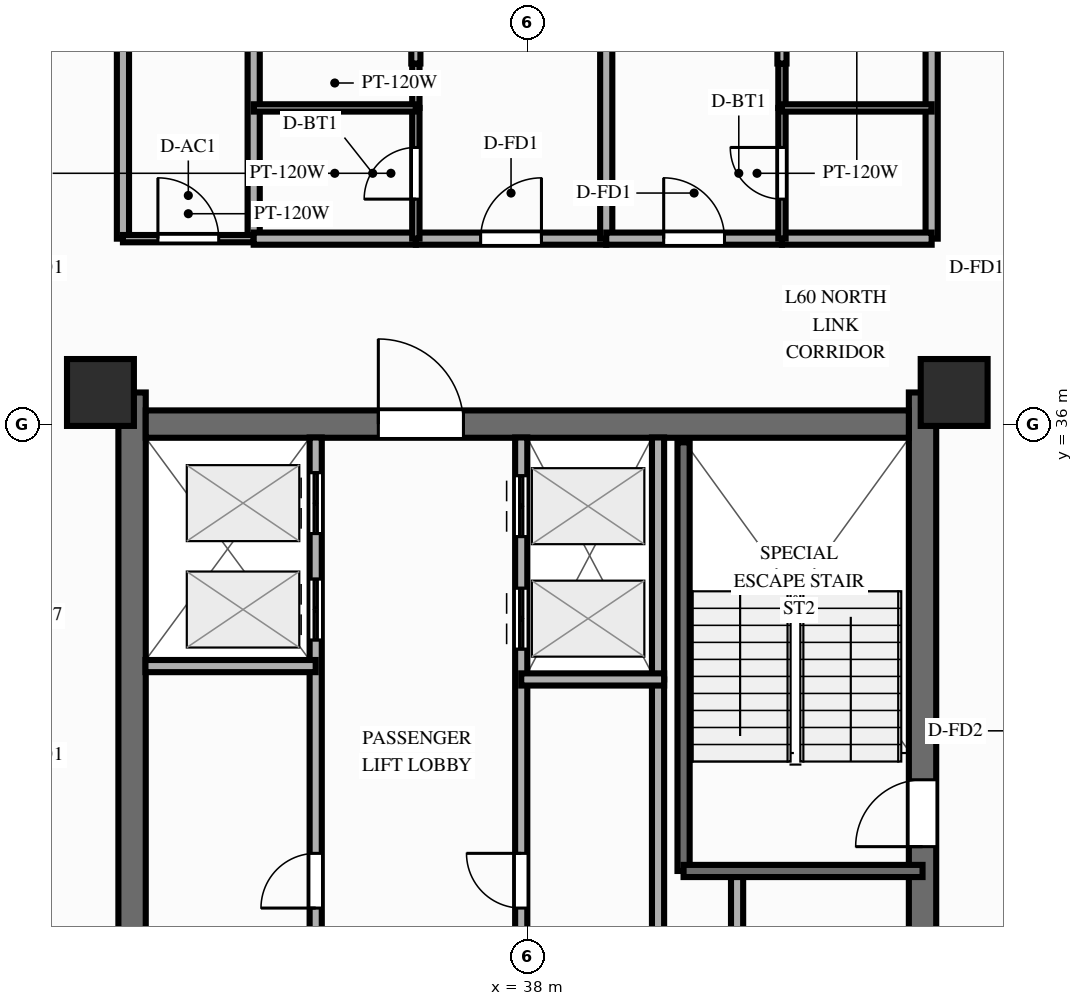
"""IFC4 building model, lengths in metres.
Left out: names, types, materials, properties, quantities, classifications, styles, units other than length and angle.
Written with IfcOpenShell. Run it as: python <this file> out.ifc"""

import sys

from ifc_helpers import new_model, si_unit, direction, frame, frame_2d, origin, origin_2d, place, context, subcontext, project, spatial, rectangle, extrude, source, transform, mapped, element, fill, save


model = new_model("IFC4")
c1 = context("Model", 3, precision=1e-05, world=origin(), true_north=direction((0.0, 1.0)))
c2 = subcontext(c1, "Body", "Model", "MODEL_VIEW")
j1 = project(units=[si_unit("LENGTHUNIT", "METRE"), si_unit("PLANEANGLEUNIT", "RADIAN")], contexts=[c1])
p1 = place(None, origin())
s1 = spatial("IfcSite", under=j1, at=p1, CompositionType="ELEMENT")
p2 = place(p1, origin())
s2 = spatial("IfcBuilding", under=s1, at=p2, CompositionType="ELEMENT")
p3 = place(p2, frame((0.0, 0.0, 192.7)))
s3 = spatial("IfcBuildingStorey", under=s2, at=p3, CompositionType="ELEMENT", Elevation=192.7)
p4 = place(p3, frame((31.5, 17.48, 0.0), z_axis=(0.0, 0.0, 1.0), x_axis=(0.0, 1.0, 0.0)))
e1 = element("IfcWall", 1, at=p4, inside=s3, PredefinedType="SHEAR", context=c2, shape_type="SweptSolid", body=[
    extrude(rectangle(XDim=19.04, YDim=0.45, at=frame_2d((9.52, 0.0))), origin(), (0.0, 0.0, 1.0), 3.9),
])
p5 = place(p4, frame((6.32, 0.0, 0.0)))
e2 = element("IfcOpeningElement", 2, at=p5, cuts=e1, PredefinedType="OPENING", context=c2, shape_type="SweptSolid", body=[
    extrude(rectangle(XDim=1.1, YDim=2.15, at=frame_2d((0.55, 1.075))), frame((0.0, 0.237, 0.0), z_axis=(0.0, -1.0, 0.0), x_axis=(1.0, 0.0, 0.0)), (0.0, 0.0, 1.0), 0.474),
])
p6 = place(p3, frame((44.5, 17.48, 0.0), z_axis=(0.0, 0.0, 1.0), x_axis=(0.0, 1.0, 0.0)))
e3 = element("IfcWall", 3, at=p6, inside=s3, PredefinedType="SHEAR", context=c2, shape_type="SweptSolid", body=[
    extrude(rectangle(XDim=19.04, YDim=0.45, at=frame_2d((9.52, 0.0))), origin(), (0.0, 0.0, 1.0), 3.9),
])
p7 = place(p6, frame((12.67, 0.0, 0.0), z_axis=(0.0, 0.0, 1.0), x_axis=(-1.0, 0.0, 0.0)))
e4 = element("IfcOpeningElement", 4, at=p7, cuts=e3, PredefinedType="OPENING", context=c2, shape_type="SweptSolid", body=[
    extrude(rectangle(XDim=1.1, YDim=2.15, at=frame_2d((0.55, 1.075))), frame((0.0, 0.237, 0.0), z_axis=(0.0, -1.0, 0.0), x_axis=(1.0, 0.0, 0.0)), (0.0, 0.0, 1.0), 0.474),
])
p8 = place(p3, frame((31.725, 36.0, 0.0), z_axis=(0.0, 0.0, 1.0), x_axis=(1.0, 0.0, 0.0)))
e5 = element("IfcWall", 5, at=p8, inside=s3, PredefinedType="SHEAR", context=c2, shape_type="SweptSolid", body=[
    extrude(rectangle(XDim=12.55, YDim=0.45, at=frame_2d((6.275, 0.0))), origin(), (0.0, 0.0, 1.0), 3.9),
])
p9 = place(p8, frame((5.225, 0.0, 0.0), z_axis=(0.0, 0.0, 1.0), x_axis=(-1.0, 0.0, 0.0)))
e6 = element("IfcOpeningElement", 6, at=p9, cuts=e5, PredefinedType="OPENING", context=c2, shape_type="SweptSolid", body=[
    extrude(rectangle(XDim=1.4, YDim=2.15, at=frame_2d((0.7, 1.075))), frame((0.0, 0.237, 0.0), z_axis=(0.0, -1.0, 0.0), x_axis=(1.0, 0.0, 0.0)), (0.0, 0.0, 1.0), 0.474),
])
m1 = source(origin(), c2, "Body", "SweptSolid", [
    extrude(rectangle(XDim=1.1, YDim=1.1, at=origin_2d()), origin(), (0.0, 0.0, 1.0), 3.9),
])
for number, where, z_axis, x_axis in (
    (7, (30.98, 36.52, 0.0), (0.0, 0.0, 1.0), (1.0, 0.0, 0.0)),
    (8, (45.02, 36.52, 0.0), (0.0, 0.0, 1.0), (1.0, 0.0, 0.0)),
):
    element("IfcColumn", number, at=place(p3, frame(where, z_axis=z_axis, x_axis=x_axis)), inside=s3, PredefinedType="COLUMN", context=c2, shape_type="MappedRepresentation", body=[
        mapped(m1, transform((0.0, 0.0, 0.0), scale=1.0)),
    ])
p10 = place(p3, frame((41.45, 21.18, 0.0), z_axis=(0.0, 0.0, 1.0), x_axis=(0.0, 1.0, 0.0)))
e9 = element("IfcWall", 9, at=p10, inside=s3, PredefinedType="PARTITIONING", context=c2, shape_type="SweptSolid", body=[
    extrude(rectangle(XDim=7.42, YDim=0.2, at=frame_2d((3.71, 0.0))), origin(), (0.0, 0.0, 1.0), 3.56),
])
p11 = place(p10, frame((2.6, 0.0, 0.0)))
e10 = element("IfcOpeningElement", 10, at=p11, cuts=e9, PredefinedType="OPENING", context=c2, shape_type="SweptSolid", body=[
    extrude(rectangle(XDim=0.9, YDim=2.1, at=frame_2d((0.45, 1.05))), frame((0.0, 0.112, 0.0), z_axis=(0.0, -1.0, 0.0), x_axis=(1.0, 0.0, 0.0)), (0.0, 0.0, 1.0), 0.224),
])
p12 = place(p3, frame((40.15, 25.44, 0.0), z_axis=(0.0, 0.0, 1.0), x_axis=(0.0, 1.0, 0.0)))
e11 = element("IfcWall", 11, at=p12, inside=s3, PredefinedType="PARTITIONING", context=c2, shape_type="SweptSolid", body=[
    extrude(rectangle(XDim=6.36, YDim=0.2, at=frame_2d((3.18, 0.0))), origin(), (0.0, 0.0, 1.0), 3.56),
])
p13 = place(p3, frame((40.15, 31.8, 0.0), z_axis=(0.0, 0.0, 1.0), x_axis=(0.0, 1.0, 0.0)))
e12 = element("IfcWall", 12, at=p13, inside=s3, PredefinedType="PARTITIONING", context=c2, shape_type="SweptSolid", body=[
    extrude(rectangle(XDim=3.98, YDim=0.2, at=frame_2d((1.99, 0.0))), origin(), (0.0, 0.0, 1.0), 3.56),
])
p14 = place(p3, frame((40.57, 28.65, 0.0), z_axis=(0.0, 0.0, 1.0), x_axis=(0.0, 1.0, 0.0)))
e13 = element("IfcWall", 13, at=p14, inside=s3, PredefinedType="SOLIDWALL", context=c2, shape_type="SweptSolid", body=[
    extrude(rectangle(XDim=7.05, YDim=0.2, at=frame_2d((3.525, 0.0))), origin(), (0.0, 0.0, 1.0), 3.69),
])
p15 = place(p3, frame((40.57, 28.65, 0.0), z_axis=(0.0, 0.0, 1.0), x_axis=(1.0, 0.0, 0.0)))
e14 = element("IfcWall", 14, at=p15, inside=s3, PredefinedType="SOLIDWALL", context=c2, shape_type="SweptSolid", body=[
    extrude(rectangle(XDim=3.93, YDim=0.2, at=frame_2d((1.965, 0.0))), origin(), (0.0, 0.0, 1.0), 3.69),
])
p16 = place(p3, frame((34.52, 25.44, 0.0), z_axis=(0.0, 0.0, 1.0), x_axis=(0.0, 1.0, 0.0)))
e15 = element("IfcWall", 15, at=p16, inside=s3, PredefinedType="PARTITIONING", context=c2, shape_type="SweptSolid", body=[
    extrude(rectangle(XDim=10.34, YDim=0.2, at=frame_2d((5.17, 0.0))), origin(), (0.0, 0.0, 1.0), 3.56),
])
p17 = place(p16, frame((2.6, 0.0, 0.0)))
e16 = element("IfcOpeningElement", 16, at=p17, cuts=e15, PredefinedType="OPENING", context=c2, shape_type="SweptSolid", body=[
    extrude(rectangle(XDim=0.9, YDim=2.1, at=frame_2d((0.45, 1.05))), frame((0.0, 0.112, 0.0), z_axis=(0.0, -1.0, 0.0), x_axis=(1.0, 0.0, 0.0)), (0.0, 0.0, 1.0), 0.224),
])
p18 = place(p16, frame((7.01, 0.0, 0.0)))
e17 = element("IfcOpeningElement", 17, at=p18, cuts=e15, PredefinedType="OPENING", context=c2, shape_type="SweptSolid", body=[
    extrude(rectangle(XDim=1.0, YDim=2.15, at=frame_2d((0.5, 1.075))), frame((0.0, 0.112, 0.0), z_axis=(0.0, -1.0, 0.0), x_axis=(1.0, 0.0, 0.0)), (0.0, 0.0, 1.0), 0.224),
])
p19 = place(p16, frame((8.76, 0.0, 0.0)))
e18 = element("IfcOpeningElement", 18, at=p19, cuts=e15, PredefinedType="OPENING", context=c2, shape_type="SweptSolid", body=[
    extrude(rectangle(XDim=1.0, YDim=2.15, at=frame_2d((0.5, 1.075))), frame((0.0, 0.112, 0.0), z_axis=(0.0, -1.0, 0.0), x_axis=(1.0, 0.0, 0.0)), (0.0, 0.0, 1.0), 0.224),
])
p20 = place(p3, frame((31.72, 32.02, 0.0), z_axis=(0.0, 0.0, 1.0), x_axis=(1.0, 0.0, 0.0)))
e19 = element("IfcWall", 19, at=p20, inside=s3, PredefinedType="PARTITIONING", context=c2, shape_type="SweptSolid", body=[
    extrude(rectangle(XDim=2.8, YDim=0.2, at=frame_2d((1.4, 0.0))), origin(), (0.0, 0.0, 1.0), 3.56),
])
p21 = place(p3, frame((37.9, 25.44, 0.0), z_axis=(0.0, 0.0, 1.0), x_axis=(0.0, 1.0, 0.0)))
e20 = element("IfcWall", 20, at=p21, inside=s3, PredefinedType="PARTITIONING", context=c2, shape_type="SweptSolid", body=[
    extrude(rectangle(XDim=10.34, YDim=0.2, at=frame_2d((5.17, 0.0))), origin(), (0.0, 0.0, 1.0), 3.56),
])
p22 = place(p21, frame((2.6, 0.0, 0.0)))
e21 = element("IfcOpeningElement", 21, at=p22, cuts=e20, PredefinedType="OPENING", context=c2, shape_type="SweptSolid", body=[
    extrude(rectangle(XDim=0.9, YDim=2.1, at=frame_2d((0.45, 1.05))), frame((0.0, 0.112, 0.0), z_axis=(0.0, -1.0, 0.0), x_axis=(1.0, 0.0, 0.0)), (0.0, 0.0, 1.0), 0.224),
])
p23 = place(p21, frame((6.86, 0.0, 0.0)))
e22 = element("IfcOpeningElement", 22, at=p23, cuts=e20, PredefinedType="OPENING", context=c2, shape_type="SweptSolid", body=[
    extrude(rectangle(XDim=1.0, YDim=2.15, at=frame_2d((0.5, 1.075))), frame((0.0, 0.112, 0.0), z_axis=(0.0, -1.0, 0.0), x_axis=(1.0, 0.0, 0.0)), (0.0, 0.0, 1.0), 0.224),
])
p24 = place(p21, frame((8.71, 0.0, 0.0)))
e23 = element("IfcOpeningElement", 23, at=p24, cuts=e20, PredefinedType="OPENING", context=c2, shape_type="SweptSolid", body=[
    extrude(rectangle(XDim=1.0, YDim=2.15, at=frame_2d((0.5, 1.075))), frame((0.0, 0.112, 0.0), z_axis=(0.0, -1.0, 0.0), x_axis=(1.0, 0.0, 0.0)), (0.0, 0.0, 1.0), 0.224),
])
p25 = place(p3, frame((37.9, 31.8, 0.0), z_axis=(0.0, 0.0, 1.0), x_axis=(1.0, 0.0, 0.0)))
e24 = element("IfcWall", 24, at=p25, inside=s3, PredefinedType="PARTITIONING", context=c2, shape_type="SweptSolid", body=[
    extrude(rectangle(XDim=2.35, YDim=0.2, at=frame_2d((1.175, 0.0))), origin(), (0.0, 0.0, 1.0), 3.56),
])
for number, where, z_axis, x_axis in (
    (25, (31.35, 39.05, 0.0), (0.0, 0.0, 1.0), (0.0, 1.0, 0.0)),
    (26, (44.65, 39.05, 0.0), (0.0, 0.0, 1.0), (0.0, 1.0, 0.0)),
):
    element("IfcWall", number, at=place(p3, frame(where, z_axis=z_axis, x_axis=x_axis)), inside=s3, PredefinedType="PARTITIONING", context=c2, shape_type="SweptSolid", body=[
        extrude(rectangle(XDim=8.8, YDim=0.2, at=frame_2d((4.4, 0.0))), origin(), (0.0, 0.0, 1.0), 2.44),
    ])
p26 = place(p3, frame((33.5, 39.05, 0.0), z_axis=(0.0, 0.0, 1.0), x_axis=(0.0, 1.0, 0.0)))
e27 = element("IfcWall", 27, at=p26, inside=s3, PredefinedType="PARTITIONING", context=c2, shape_type="SweptSolid", body=[
    extrude(rectangle(XDim=8.8, YDim=0.2, at=frame_2d((4.4, 0.0))), origin(), (0.0, 0.0, 1.0), 3.56),
])
p27 = place(p3, frame((31.35, 39.05, 0.0), z_axis=(0.0, 0.0, 1.0), x_axis=(1.0, 0.0, 0.0)))
e28 = element("IfcWall", 28, at=p27, inside=s3, PredefinedType="PARTITIONING", context=c2, shape_type="SweptSolid", body=[
    extrude(rectangle(XDim=2.15, YDim=0.12, at=frame_2d((1.075, 0.0))), origin(), (0.0, 0.0, 1.0), 3.56),
])
p28 = place(p27, frame((0.575, 0.0, 0.0)))
e29 = element("IfcOpeningElement", 29, at=p28, cuts=e28, PredefinedType="OPENING", context=c2, shape_type="SweptSolid", body=[
    extrude(rectangle(XDim=1.0, YDim=2.1, at=frame_2d((0.5, 1.05))), frame((0.0, 0.072, 0.0), z_axis=(0.0, -1.0, 0.0), x_axis=(1.0, 0.0, 0.0)), (0.0, 0.0, 1.0), 0.144),
])
p29 = place(p3, frame((33.5, 39.05, 0.0), z_axis=(0.0, 0.0, 1.0), x_axis=(1.0, 0.0, 0.0)))
e30 = element("IfcWall", 30, at=p29, inside=s3, PredefinedType="PARTITIONING", context=c2, shape_type="SweptSolid", body=[
    extrude(rectangle(XDim=2.667, YDim=0.2, at=frame_2d((1.333, 0.0))), origin(), (0.0, 0.0, 1.0), 3.56),
])
p30 = place(p3, frame((36.167, 39.05, 0.0), z_axis=(0.0, 0.0, 1.0), x_axis=(1.0, 0.0, 0.0)))
e31 = element("IfcWall", 31, at=p30, inside=s3, PredefinedType="PARTITIONING", context=c2, shape_type="SweptSolid", body=[
    extrude(rectangle(XDim=3.131, YDim=0.2, at=frame_2d((1.565, 0.0))), origin(), (0.0, 0.0, 1.0), 3.56),
])
p31 = place(p30, frame((1.065, 0.0, 0.0)))
e32 = element("IfcOpeningElement", 32, at=p31, cuts=e31, PredefinedType="OPENING", context=c2, shape_type="SweptSolid", body=[
    extrude(rectangle(XDim=1.0, YDim=2.15, at=frame_2d((0.5, 1.075))), frame((0.0, 0.112, 0.0), z_axis=(0.0, -1.0, 0.0), x_axis=(1.0, 0.0, 0.0)), (0.0, 0.0, 1.0), 0.224),
])
p32 = place(p3, frame((36.167, 39.05, 0.0), z_axis=(0.0, 0.0, 1.0), x_axis=(0.0, 1.0, 0.0)))
e33 = element("IfcWall", 33, at=p32, inside=s3, PredefinedType="PARTITIONING", context=c2, shape_type="SweptSolid", body=[
    extrude(rectangle(XDim=2.15, YDim=0.12, at=frame_2d((1.075, 0.0))), origin(), (0.0, 0.0, 1.0), 3.56),
])
p33 = place(p32, frame((0.65, 0.0, 0.0)))
e34 = element("IfcOpeningElement", 34, at=p33, cuts=e33, PredefinedType="OPENING", context=c2, shape_type="SweptSolid", body=[
    extrude(rectangle(XDim=0.85, YDim=2.05, at=frame_2d((0.425, 1.025))), frame((0.0, 0.072, 0.0), z_axis=(0.0, -1.0, 0.0), x_axis=(1.0, 0.0, 0.0)), (0.0, 0.0, 1.0), 0.144),
])
p34 = place(p3, frame((36.167, 41.2, 0.0), z_axis=(0.0, 0.0, 1.0), x_axis=(0.0, 1.0, 0.0)))
e35 = element("IfcWall", 35, at=p34, inside=s3, PredefinedType="PARTITIONING", context=c2, shape_type="SweptSolid", body=[
    extrude(rectangle(XDim=0.73, YDim=0.12, at=frame_2d((0.365, 0.0))), origin(), (0.0, 0.0, 1.0), 3.56),
])
p35 = place(p3, frame((33.5, 41.2, 0.0), z_axis=(0.0, 0.0, 1.0), x_axis=(1.0, 0.0, 0.0)))
e36 = element("IfcWall", 36, at=p35, inside=s3, PredefinedType="PARTITIONING", context=c2, shape_type="SweptSolid", body=[
    extrude(rectangle(XDim=2.667, YDim=0.12, at=frame_2d((1.333, 0.0))), origin(), (0.0, 0.0, 1.0), 3.56),
])
p36 = place(p3, frame((36.167, 41.93, 0.0), z_axis=(0.0, 0.0, 1.0), x_axis=(0.0, 1.0, 0.0)))
e37 = element("IfcWall", 37, at=p36, inside=s3, PredefinedType="PARTITIONING", context=c2, shape_type="SweptSolid", body=[
    extrude(rectangle(XDim=5.92, YDim=0.15, at=frame_2d((2.96, 0.0))), origin(), (0.0, 0.0, 1.0), 3.56),
])
p37 = place(p36, frame((2.321, 0.0, 0.0)))
e38 = element("IfcOpeningElement", 38, at=p37, cuts=e37, PredefinedType="OPENING", context=c2, shape_type="SweptSolid", body=[
    extrude(rectangle(XDim=0.9, YDim=2.1, at=frame_2d((0.45, 1.05))), frame((0.0, 0.087, 0.0), z_axis=(0.0, -1.0, 0.0), x_axis=(1.0, 0.0, 0.0)), (0.0, 0.0, 1.0), 0.174),
])
p38 = place(p3, frame((39.298, 39.05, 0.0), z_axis=(0.0, 0.0, 1.0), x_axis=(0.0, 1.0, 0.0)))
e39 = element("IfcWall", 39, at=p38, inside=s3, PredefinedType="PARTITIONING", context=c2, shape_type="SweptSolid", body=[
    extrude(rectangle(XDim=8.8, YDim=0.2, at=frame_2d((4.4, 0.0))), origin(), (0.0, 0.0, 1.0), 3.56),
])
p39 = place(p3, frame((39.298, 39.05, 0.0), z_axis=(0.0, 0.0, 1.0), x_axis=(1.0, 0.0, 0.0)))
e40 = element("IfcWall", 40, at=p39, inside=s3, PredefinedType="PARTITIONING", context=c2, shape_type="SweptSolid", body=[
    extrude(rectangle(XDim=2.89, YDim=0.2, at=frame_2d((1.445, 0.0))), origin(), (0.0, 0.0, 1.0), 3.56),
])
p40 = place(p39, frame((0.945, 0.0, 0.0)))
e41 = element("IfcOpeningElement", 41, at=p40, cuts=e40, PredefinedType="OPENING", context=c2, shape_type="SweptSolid", body=[
    extrude(rectangle(XDim=1.0, YDim=2.15, at=frame_2d((0.5, 1.075))), frame((0.0, 0.112, 0.0), z_axis=(0.0, -1.0, 0.0), x_axis=(1.0, 0.0, 0.0)), (0.0, 0.0, 1.0), 0.224),
])
p41 = place(p3, frame((42.188, 39.05, 0.0), z_axis=(0.0, 0.0, 1.0), x_axis=(1.0, 0.0, 0.0)))
e42 = element("IfcWall", 42, at=p41, inside=s3, PredefinedType="PARTITIONING", context=c2, shape_type="SweptSolid", body=[
    extrude(rectangle(XDim=2.462, YDim=0.2, at=frame_2d((1.231, 0.0))), origin(), (0.0, 0.0, 1.0), 3.56),
])
p42 = place(p3, frame((42.188, 39.05, 0.0), z_axis=(0.0, 0.0, 1.0), x_axis=(0.0, 1.0, 0.0)))
e43 = element("IfcWall", 43, at=p42, inside=s3, PredefinedType="PARTITIONING", context=c2, shape_type="SweptSolid", body=[
    extrude(rectangle(XDim=2.15, YDim=0.12, at=frame_2d((1.075, 0.0))), origin(), (0.0, 0.0, 1.0), 3.56),
])
p43 = place(p42, frame((0.65, 0.0, 0.0)))
e44 = element("IfcOpeningElement", 44, at=p43, cuts=e43, PredefinedType="OPENING", context=c2, shape_type="SweptSolid", body=[
    extrude(rectangle(XDim=0.85, YDim=2.05, at=frame_2d((0.425, 1.025))), frame((0.0, 0.072, 0.0), z_axis=(0.0, -1.0, 0.0), x_axis=(1.0, 0.0, 0.0)), (0.0, 0.0, 1.0), 0.144),
])
p44 = place(p3, frame((42.188, 41.2, 0.0), z_axis=(0.0, 0.0, 1.0), x_axis=(0.0, 1.0, 0.0)))
e45 = element("IfcWall", 45, at=p44, inside=s3, PredefinedType="PARTITIONING", context=c2, shape_type="SweptSolid", body=[
    extrude(rectangle(XDim=0.73, YDim=0.12, at=frame_2d((0.365, 0.0))), origin(), (0.0, 0.0, 1.0), 3.56),
])
p45 = place(p3, frame((42.188, 41.2, 0.0), z_axis=(0.0, 0.0, 1.0), x_axis=(1.0, 0.0, 0.0)))
e46 = element("IfcWall", 46, at=p45, inside=s3, PredefinedType="PARTITIONING", context=c2, shape_type="SweptSolid", body=[
    extrude(rectangle(XDim=2.462, YDim=0.12, at=frame_2d((1.231, 0.0))), origin(), (0.0, 0.0, 1.0), 3.56),
])
p46 = place(p3, frame((42.188, 41.93, 0.0), z_axis=(0.0, 0.0, 1.0), x_axis=(0.0, 1.0, 0.0)))
e47 = element("IfcWall", 47, at=p46, inside=s3, PredefinedType="PARTITIONING", context=c2, shape_type="SweptSolid", body=[
    extrude(rectangle(XDim=5.92, YDim=0.15, at=frame_2d((2.96, 0.0))), origin(), (0.0, 0.0, 1.0), 3.56),
])
p47 = place(p46, frame((2.321, 0.0, 0.0)))
e48 = element("IfcOpeningElement", 48, at=p47, cuts=e47, PredefinedType="OPENING", context=c2, shape_type="SweptSolid", body=[
    extrude(rectangle(XDim=0.9, YDim=2.1, at=frame_2d((0.45, 1.05))), frame((0.0, 0.087, 0.0), z_axis=(0.0, -1.0, 0.0), x_axis=(1.0, 0.0, 0.0)), (0.0, 0.0, 1.0), 0.174),
])
m2 = source(origin(), c2, "Body", "SweptSolid", [
    extrude(rectangle(XDim=1.1, YDim=2.15, at=frame_2d((0.55, 1.075))), frame((0.0, 0.025, 0.0), z_axis=(0.0, -1.0, 0.0), x_axis=(1.0, 0.0, 0.0)), (0.0, 0.0, 1.0), 0.05),
])
p48 = place(p7, origin())
e49 = element("IfcDoor", 49, at=p48, inside=s3, OperationType="SINGLE_SWING_RIGHT", PredefinedType="DOOR", context=c2, shape_type="MappedRepresentation", body=[
    mapped(m2, transform((0.0, 0.0, 0.0), scale=1.0)),
])
fill(e4, e49)
m3 = source(origin(), c2, "Body", "SweptSolid", [
    extrude(rectangle(XDim=1.4, YDim=2.15, at=frame_2d((0.7, 1.075))), frame((0.0, 0.025, 0.0), z_axis=(0.0, -1.0, 0.0), x_axis=(1.0, 0.0, 0.0)), (0.0, 0.0, 1.0), 0.05),
])
p49 = place(p9, origin())
e50 = element("IfcDoor", 50, at=p49, inside=s3, OperationType="SINGLE_SWING_RIGHT", PredefinedType="DOOR", context=c2, shape_type="MappedRepresentation", body=[
    mapped(m3, transform((0.0, 0.0, 0.0), scale=1.0)),
])
fill(e6, e50)
m4 = source(origin(), c2, "Body", "SweptSolid", [
    extrude(rectangle(XDim=0.9, YDim=2.1, at=frame_2d((0.45, 1.05))), frame((0.0, 0.025, 0.0), z_axis=(0.0, -1.0, 0.0), x_axis=(1.0, 0.0, 0.0)), (0.0, 0.0, 1.0), 0.05),
])
p50 = place(p17, origin())
e51 = element("IfcDoor", 51, at=p50, inside=s3, OperationType="SINGLE_SWING_LEFT", PredefinedType="DOOR", context=c2, shape_type="MappedRepresentation", body=[
    mapped(m4, transform((0.0, 0.0, 0.0), scale=1.0)),
])
fill(e16, e51)
m5 = source(origin(), c2, "Body", "SweptSolid", [
    extrude(rectangle(XDim=1.0, YDim=2.15, at=frame_2d((0.5, 1.075))), frame((0.0, 0.025, 0.0), z_axis=(0.0, -1.0, 0.0), x_axis=(1.0, 0.0, 0.0)), (0.0, 0.0, 1.0), 0.05),
])
p51 = place(p18, origin())
e52 = element("IfcDoor", 52, at=p51, inside=s3, OperationType="DOUBLE_DOOR_SLIDING", PredefinedType="DOOR", context=c2, shape_type="MappedRepresentation", body=[
    mapped(m5, transform((0.0, 0.0, 0.0), scale=1.0)),
])
fill(e17, e52)
p52 = place(p19, origin())
e53 = element("IfcDoor", 53, at=p52, inside=s3, OperationType="DOUBLE_DOOR_SLIDING", PredefinedType="DOOR", context=c2, shape_type="MappedRepresentation", body=[
    mapped(m5, transform((0.0, 0.0, 0.0), scale=1.0)),
])
fill(e18, e53)
p53 = place(p22, origin())
e54 = element("IfcDoor", 54, at=p53, inside=s3, OperationType="SINGLE_SWING_RIGHT", PredefinedType="DOOR", context=c2, shape_type="MappedRepresentation", body=[
    mapped(m4, transform((0.0, 0.0, 0.0), scale=1.0)),
])
fill(e21, e54)
p54 = place(p23, origin())
e55 = element("IfcDoor", 55, at=p54, inside=s3, OperationType="DOUBLE_DOOR_SLIDING", PredefinedType="DOOR", context=c2, shape_type="MappedRepresentation", body=[
    mapped(m5, transform((0.0, 0.0, 0.0), scale=1.0)),
])
fill(e22, e55)
p55 = place(p24, origin())
e56 = element("IfcDoor", 56, at=p55, inside=s3, OperationType="DOUBLE_DOOR_SLIDING", PredefinedType="DOOR", context=c2, shape_type="MappedRepresentation", body=[
    mapped(m5, transform((0.0, 0.0, 0.0), scale=1.0)),
])
fill(e23, e56)
m6 = source(origin(), c2, "Body", "SweptSolid", [
    extrude(rectangle(XDim=1.0, YDim=2.1, at=frame_2d((0.5, 1.05))), frame((0.0, 0.025, 0.0), z_axis=(0.0, -1.0, 0.0), x_axis=(1.0, 0.0, 0.0)), (0.0, 0.0, 1.0), 0.05),
])
p56 = place(p28, origin())
e57 = element("IfcDoor", 57, at=p56, inside=s3, OperationType="SINGLE_SWING_LEFT", PredefinedType="DOOR", context=c2, shape_type="MappedRepresentation", body=[
    mapped(m6, transform((0.0, 0.0, 0.0), scale=1.0)),
])
fill(e29, e57)
p57 = place(p31, origin())
e58 = element("IfcDoor", 58, at=p57, inside=s3, OperationType="SINGLE_SWING_RIGHT", PredefinedType="DOOR", context=c2, shape_type="MappedRepresentation", body=[
    mapped(m5, transform((0.0, 0.0, 0.0), scale=1.0)),
])
fill(e32, e58)
m7 = source(origin(), c2, "Body", "SweptSolid", [
    extrude(rectangle(XDim=0.85, YDim=2.05, at=frame_2d((0.425, 1.025))), frame((0.0, 0.025, 0.0), z_axis=(0.0, -1.0, 0.0), x_axis=(1.0, 0.0, 0.0)), (0.0, 0.0, 1.0), 0.05),
])
p58 = place(p33, origin())
e59 = element("IfcDoor", 59, at=p58, inside=s3, OperationType="SINGLE_SWING_LEFT", PredefinedType="DOOR", context=c2, shape_type="MappedRepresentation", body=[
    mapped(m7, transform((0.0, 0.0, 0.0), scale=1.0)),
])
fill(e34, e59)
p59 = place(p40, origin())
e60 = element("IfcDoor", 60, at=p59, inside=s3, OperationType="SINGLE_SWING_LEFT", PredefinedType="DOOR", context=c2, shape_type="MappedRepresentation", body=[
    mapped(m5, transform((0.0, 0.0, 0.0), scale=1.0)),
])
fill(e41, e60)
p60 = place(p43, origin())
e61 = element("IfcDoor", 61, at=p60, inside=s3, OperationType="SINGLE_SWING_RIGHT", PredefinedType="DOOR", context=c2, shape_type="MappedRepresentation", body=[
    mapped(m7, transform((0.0, 0.0, 0.0), scale=1.0)),
])
fill(e44, e61)
save(model, sys.argv[1])
